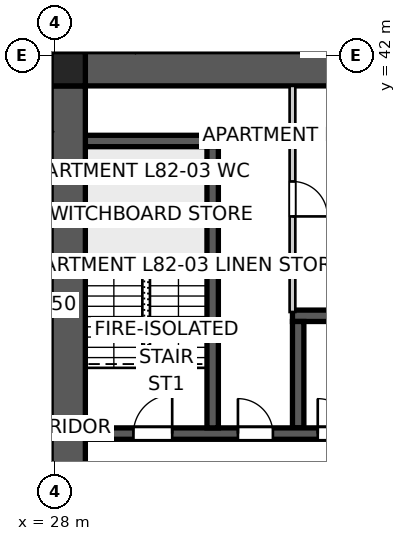
"""IFC4 building model, lengths in metres.
Left out: names, types, materials, properties, quantities, classifications, styles, units other than length and angle.
Written with IfcOpenShell. Run it as: python <this file> out.ifc"""

import sys

from ifc_helpers import new_model, si_unit, direction, frame, frame_2d, origin, origin_2d, place, context, subcontext, project, spatial, polyline, rectangle, outline, extrude, element, fill, save


model = new_model("IFC4")
c1 = context("Model", 3, precision=1e-05, world=origin(), true_north=direction((0.0, 1.0)))
c2 = subcontext(c1, "Body", "Model", "MODEL_VIEW")
j1 = project(units=[si_unit("LENGTHUNIT", "METRE"), si_unit("PLANEANGLEUNIT", "RADIAN")], contexts=[c1])
p1 = place(None, origin())
s1 = spatial("IfcSite", under=j1, at=p1, CompositionType="ELEMENT")
p2 = place(p1, origin())
s2 = spatial("IfcBuilding", under=s1, at=p2, CompositionType="ELEMENT")
p3 = place(p2, frame((0.0, 0.0, 296.4)))
s3 = spatial("IfcBuildingStorey", under=s2, at=p3, CompositionType="ELEMENT", Elevation=296.4)
p4 = place(p3, frame((28.8, 41.65, 0.0), z_axis=(0.0, 0.0, 1.0), x_axis=(1.0, 0.0, 0.0)))
e1 = element("IfcWall", 1, at=p4, inside=s3, PredefinedType="SHEAR", context=c2, shape_type="SweptSolid", body=[
    extrude(outline(polyline([(0.0, -0.45), (22.4, -0.45), (22.4, -0.025), (22.85, -0.025), (22.85, 0.025), (22.4, 0.025), (22.4, 0.45), (0.0, 0.45), (0.0, 0.025), (-0.45, 0.025), (-0.45, -0.025), (0.0, -0.025), (0.0, -0.45)])), origin(), (0.0, 0.0, 1.0), 3.4),
])
p5 = place(p3, frame((28.35, 41.2, 0.0), z_axis=(0.0, 0.0, 1.0), x_axis=(0.0, -1.0, 0.0)))
e2 = element("IfcWall", 2, at=p5, inside=s3, PredefinedType="SHEAR", context=c2, shape_type="SweptSolid", body=[
    extrude(outline(polyline([(0.0, -0.45), (22.4, -0.45), (22.4, -0.025), (22.85, -0.025), (22.85, 0.025), (22.4, 0.025), (22.4, 0.45), (0.0, 0.45), (0.0, 0.025), (-0.45, 0.025), (-0.45, -0.025), (0.0, -0.025), (0.0, -0.45)])), origin(), (0.0, 0.0, 1.0), 3.4),
])
p6 = place(p5, frame((11.14, 0.0, 0.0)))
e3 = element("IfcOpeningElement", 3, at=p6, cuts=e2, PredefinedType="OPENING", context=c2, shape_type="SweptSolid", body=[
    extrude(rectangle(XDim=1.02, YDim=2.4, at=frame_2d((0.51, 1.2))), frame((0.0, 0.46, 0.0), z_axis=(0.0, -1.0, 0.0), x_axis=(1.0, 0.0, 0.0)), (0.0, 0.0, 1.0), 0.92),
])
p7 = place(p3, frame((28.8, 32.05, 0.0), z_axis=(0.0, 0.0, 1.0), x_axis=(1.0, 0.0, 0.0)))
e4 = element("IfcWall", 4, at=p7, inside=s3, PredefinedType="SHEAR", context=c2, shape_type="SweptSolid", body=[
    extrude(rectangle(XDim=22.4, YDim=0.3, at=frame_2d((11.2, 0.0))), origin(), (0.0, 0.0, 1.0), 3.4),
])
p8 = place(p7, frame((19.04, 0.0, 0.0)))
e5 = element("IfcOpeningElement", 5, at=p8, cuts=e4, PredefinedType="OPENING", context=c2, shape_type="SweptSolid", body=[
    extrude(rectangle(XDim=0.92, YDim=2.1, at=frame_2d((0.46, 1.05))), frame((0.0, 0.16, 0.0), z_axis=(0.0, -1.0, 0.0), x_axis=(1.0, 0.0, 0.0)), (0.0, 0.0, 1.0), 0.32),
])
p9 = place(p7, frame((1.265, 0.0, 0.0)))
e6 = element("IfcOpeningElement", 6, at=p9, cuts=e4, PredefinedType="OPENING", context=c2, shape_type="SweptSolid", body=[
    extrude(rectangle(XDim=1.02, YDim=2.1, at=frame_2d((0.51, 1.05))), frame((0.0, 0.16, 0.0), z_axis=(0.0, -1.0, 0.0), x_axis=(1.0, 0.0, 0.0)), (0.0, 0.0, 1.0), 0.32),
])
p10 = place(p7, frame((4.015, 0.0, 0.0)))
e7 = element("IfcOpeningElement", 7, at=p10, cuts=e4, PredefinedType="OPENING", context=c2, shape_type="SweptSolid", body=[
    extrude(rectangle(XDim=0.92, YDim=2.1, at=frame_2d((0.46, 1.05))), frame((0.0, 0.16, 0.0), z_axis=(0.0, -1.0, 0.0), x_axis=(1.0, 0.0, 0.0)), (0.0, 0.0, 1.0), 0.32),
])
p11 = place(p7, frame((6.115, 0.0, 0.0)))
e8 = element("IfcOpeningElement", 8, at=p11, cuts=e4, PredefinedType="OPENING", context=c2, shape_type="SweptSolid", body=[
    extrude(rectangle(XDim=0.92, YDim=2.1, at=frame_2d((0.46, 1.05))), frame((0.0, 0.16, 0.0), z_axis=(0.0, -1.0, 0.0), x_axis=(1.0, 0.0, 0.0)), (0.0, 0.0, 1.0), 0.32),
])
p12 = place(p7, frame((9.79, 0.0, 0.0)))
e9 = element("IfcOpeningElement", 9, at=p12, cuts=e4, PredefinedType="OPENING", context=c2, shape_type="SweptSolid", body=[
    extrude(rectangle(XDim=0.92, YDim=2.1, at=frame_2d((0.46, 1.05))), frame((0.0, 0.16, 0.0), z_axis=(0.0, -1.0, 0.0), x_axis=(1.0, 0.0, 0.0)), (0.0, 0.0, 1.0), 0.32),
])
p13 = place(p7, frame((12.05, 0.0, 0.0)))
e10 = element("IfcOpeningElement", 10, at=p13, cuts=e4, PredefinedType="OPENING", context=c2, shape_type="SweptSolid", body=[
    extrude(rectangle(XDim=1.1, YDim=2.1, at=frame_2d((0.55, 1.05))), frame((0.0, 0.16, 0.0), z_axis=(0.0, -1.0, 0.0), x_axis=(1.0, 0.0, 0.0)), (0.0, 0.0, 1.0), 0.32),
])
p14 = place(p7, frame((14.85, 0.0, 0.0)))
e11 = element("IfcOpeningElement", 11, at=p14, cuts=e4, PredefinedType="OPENING", context=c2, shape_type="SweptSolid", body=[
    extrude(rectangle(XDim=1.1, YDim=2.1, at=frame_2d((0.55, 1.05))), frame((0.0, 0.16, 0.0), z_axis=(0.0, -1.0, 0.0), x_axis=(1.0, 0.0, 0.0)), (0.0, 0.0, 1.0), 0.32),
])
p15 = place(p3, frame((34.25, 35.15, 0.0), z_axis=(0.0, 0.0, 1.0), x_axis=(1.0, 0.0, 0.0)))
e12 = element("IfcWall", 12, at=p15, inside=s3, PredefinedType="SHEAR", context=c2, shape_type="SweptSolid", body=[
    extrude(rectangle(XDim=11.5, YDim=0.3, at=frame_2d((5.75, 0.0))), origin(), (0.0, 0.0, 1.0), 3.4),
])
p16 = place(p3, frame((34.4, 32.2, 0.0), z_axis=(0.0, 0.0, 1.0), x_axis=(0.0, 1.0, 0.0)))
e13 = element("IfcWall", 13, at=p16, inside=s3, PredefinedType="SHEAR", context=c2, shape_type="SweptSolid", body=[
    extrude(rectangle(XDim=2.8, YDim=0.3, at=frame_2d((1.4, 0.0))), origin(), (0.0, 0.0, 1.0), 3.4),
])
p17 = place(p3, frame((32.15, 32.2, 0.0), z_axis=(0.0, 0.0, 1.0), x_axis=(0.0, 1.0, 0.0)))
e14 = element("IfcWall", 14, at=p17, inside=s3, PredefinedType="SHEAR", context=c2, shape_type="SweptSolid", body=[
    extrude(rectangle(XDim=7.7, YDim=0.3, at=frame_2d((3.85, 0.0))), origin(), (0.0, 0.0, 1.0), 3.4),
])
p18 = place(p3, frame((28.8, 39.75, 0.0), z_axis=(0.0, 0.0, 1.0), x_axis=(1.0, 0.0, 0.0)))
e15 = element("IfcWall", 15, at=p18, inside=s3, PredefinedType="SHEAR", context=c2, shape_type="SweptSolid", body=[
    extrude(rectangle(XDim=3.5, YDim=0.3, at=frame_2d((1.75, 0.0))), origin(), (0.0, 0.0, 1.0), 3.4),
])
p19 = place(p3, frame((28.35, 41.65, 0.0), z_axis=(0.0, 0.0, 1.0), x_axis=(1.0, 0.0, 0.0)))
e16 = element("IfcColumn", 16, at=p19, inside=s3, PredefinedType="COLUMN", context=c2, shape_type="SweptSolid", body=[
    extrude(rectangle(XDim=0.9, YDim=0.9, at=origin_2d()), origin(), (0.0, 0.0, 1.0), 3.4),
])
p20 = place(p3, frame((34.25, 41.2, 0.0), z_axis=(0.0, 0.0, 1.0), x_axis=(0.0, -1.0, 0.0)))
e17 = element("IfcWall", 17, at=p20, inside=s3, PredefinedType="SOLIDWALL", context=c2, shape_type="SweptSolid", body=[
    extrude(rectangle(XDim=5.95, YDim=0.15, at=frame_2d((2.975, 0.0))), origin(), (0.0, 0.0, 1.0), 3.2),
])
p21 = place(p20, frame((2.515, 0.0, 0.0)))
e18 = element("IfcOpeningElement", 18, at=p21, cuts=e17, PredefinedType="OPENING", context=c2, shape_type="SweptSolid", body=[
    extrude(rectangle(XDim=0.92, YDim=2.1, at=frame_2d((0.46, 1.05))), frame((0.0, 0.085, 0.0), z_axis=(0.0, -1.0, 0.0), x_axis=(1.0, 0.0, 0.0)), (0.0, 0.0, 1.0), 0.17),
])
p22 = place(p3, frame((30.172, 42.1, 0.0), z_axis=(0.0, 0.0, 1.0), x_axis=(-0.532913303443, 0.846169847616, 0.0)))
e19 = element("IfcWall", 19, at=p22, inside=s3, PredefinedType="PARTITIONING", context=c2, shape_type="SweptSolid", body=[
    extrude(rectangle(XDim=4.919, YDim=0.12, at=frame_2d((2.46, 0.0))), origin(), (0.0, 0.0, 1.0), 3.2),
])
p23 = place(p22, frame((1.923, 0.0, 0.0)))
e20 = element("IfcOpeningElement", 20, at=p23, cuts=e19, PredefinedType="OPENING", context=c2, shape_type="SweptSolid", body=[
    extrude(rectangle(XDim=0.96, YDim=2.0, at=frame_2d((0.48, 1.0))), frame((0.0, 0.07, 0.0), z_axis=(0.0, -1.0, 0.0), x_axis=(1.0, 0.0, 0.0)), (0.0, 0.0, 1.0), 0.14),
])
p24 = place(p3, frame((24.65, 43.828, 0.0), z_axis=(0.0, 0.0, 1.0), x_axis=(0.64277866568, -0.766051947943, 0.0)))
e21 = element("IfcWall", 21, at=p24, inside=s3, PredefinedType="PARTITIONING", context=c2, shape_type="SweptSolid", body=[
    extrude(rectangle(XDim=5.056, YDim=0.12, at=frame_2d((2.528, 0.0))), origin(), (0.0, 0.0, 1.0), 3.2),
])
p25 = place(p24, frame((2.028, 0.0, 0.0)))
e22 = element("IfcOpeningElement", 22, at=p25, cuts=e21, PredefinedType="OPENING", context=c2, shape_type="SweptSolid", body=[
    extrude(rectangle(XDim=0.96, YDim=2.0, at=frame_2d((0.48, 1.0))), frame((0.0, 0.07, 0.0), z_axis=(0.0, -1.0, 0.0), x_axis=(1.0, 0.0, 0.0)), (0.0, 0.0, 1.0), 0.14),
])
p26 = place(p9, origin())
e23 = element("IfcDoor", 23, at=p26, inside=s3, OperationType="SINGLE_SWING_RIGHT", PredefinedType="DOOR", context=c2, shape_type="SweptSolid", body=[
    extrude(rectangle(XDim=1.02, YDim=2.1, at=frame_2d((0.51, 1.05))), frame((0.0, 0.025, 0.0), z_axis=(0.0, -1.0, 0.0), x_axis=(1.0, 0.0, 0.0)), (0.0, 0.0, 1.0), 0.05),
])
fill(e6, e23)
p27 = place(p10, origin())
e24 = element("IfcDoor", 24, at=p27, inside=s3, OperationType="SINGLE_SWING_LEFT", PredefinedType="DOOR", context=c2, shape_type="SweptSolid", body=[
    extrude(rectangle(XDim=0.92, YDim=2.1, at=frame_2d((0.46, 1.05))), frame((0.0, 0.025, 0.0), z_axis=(0.0, -1.0, 0.0), x_axis=(1.0, 0.0, 0.0)), (0.0, 0.0, 1.0), 0.05),
])
fill(e7, e24)
p28 = place(p21, origin())
e25 = element("IfcDoor", 25, at=p28, inside=s3, OperationType="SINGLE_SWING_RIGHT", PredefinedType="DOOR", context=c2, shape_type="SweptSolid", body=[
    extrude(rectangle(XDim=0.92, YDim=2.1, at=frame_2d((0.46, 1.05))), frame((0.0, 0.025, 0.0), z_axis=(0.0, -1.0, 0.0), x_axis=(1.0, 0.0, 0.0)), (0.0, 0.0, 1.0), 0.05),
])
fill(e18, e25)
p29 = place(p11, origin())
e26 = element("IfcDoor", 26, at=p29, inside=s3, OperationType="SINGLE_SWING_LEFT", PredefinedType="DOOR", context=c2, shape_type="SweptSolid", body=[
    extrude(rectangle(XDim=0.92, YDim=2.1, at=frame_2d((0.46, 1.05))), frame((0.0, 0.025, 0.0), z_axis=(0.0, -1.0, 0.0), x_axis=(1.0, 0.0, 0.0)), (0.0, 0.0, 1.0), 0.05),
])
fill(e8, e26)
save(model, sys.argv[1])
